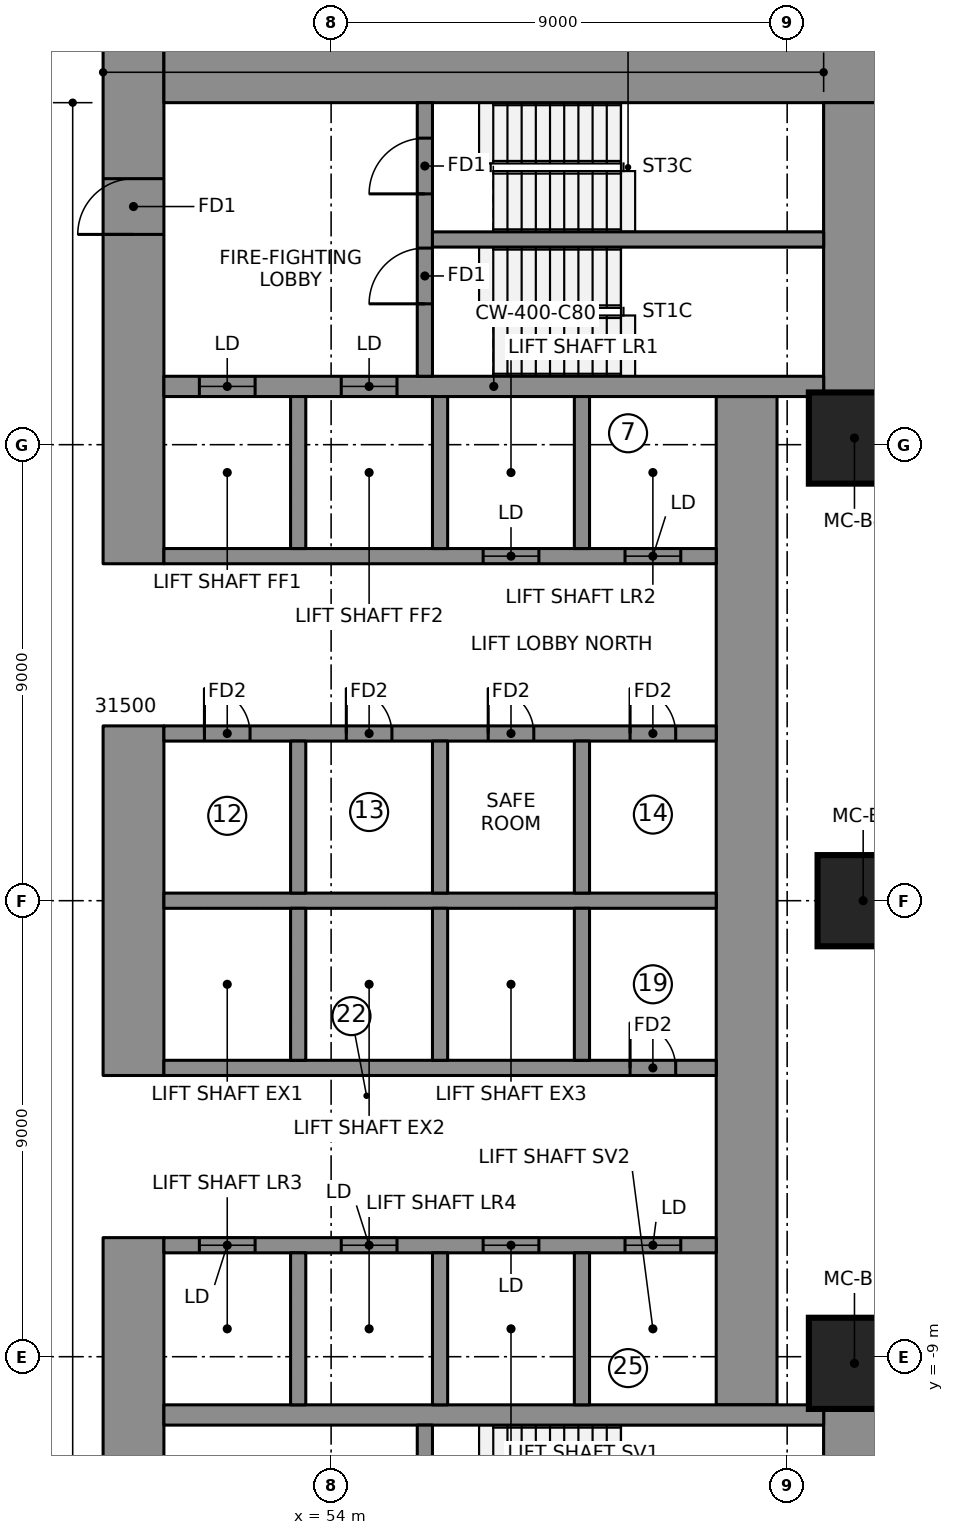
"""IFC4 building model, lengths in metres.
Left out: names, types, materials, properties, quantities, classifications, styles, units other than length and angle.
Written with IfcOpenShell. Run it as: python <this file> out.ifc"""

import sys

from ifc_helpers import new_model, si_unit, direction, frame, frame_2d, origin, origin_2d, place, context, subcontext, project, spatial, rectangle, extrude, element, fill, save


model = new_model("IFC4")
c1 = context("Model", 3, precision=1e-05, world=origin(), true_north=direction((0.0, 1.0)))
c2 = subcontext(c1, "Body", "Model", "MODEL_VIEW")
j1 = project(units=[si_unit("LENGTHUNIT", "METRE"), si_unit("PLANEANGLEUNIT", "RADIAN")], contexts=[c1])
p1 = place(None, origin())
s1 = spatial("IfcSite", under=j1, at=p1, CompositionType="ELEMENT")
p2 = place(p1, origin())
s2 = spatial("IfcBuilding", under=s1, at=p2, CompositionType="ELEMENT")
p3 = place(p2, frame((0.0, 0.0, 68.0)))
s3 = spatial("IfcBuildingStorey", under=s2, at=p3, CompositionType="ELEMENT", Elevation=68.0)
p4 = place(p3, frame((50.1, 6.65, 0.0), z_axis=(0.0, 0.0, 1.0), x_axis=(0.0, 1.0, 0.0)))
e1 = element("IfcWall", 1, at=p4, inside=s3, PredefinedType="SHEAR", context=c2, shape_type="SweptSolid", body=[
    extrude(rectangle(XDim=10.3, YDim=1.2, at=frame_2d((5.15, 0.0))), origin(), (0.0, 0.0, 1.0), 3.55),
])
p5 = place(p4, frame((6.5, 0.0, 0.0)))
e2 = element("IfcOpeningElement", 2, at=p5, cuts=e1, PredefinedType="OPENING", context=c2, shape_type="SweptSolid", body=[
    extrude(rectangle(XDim=1.1, YDim=2.1, at=frame_2d((0.55, 1.05))), frame((0.0, 0.61, 0.0), z_axis=(0.0, -1.0, 0.0), x_axis=(1.0, 0.0, 0.0)), (0.0, 0.0, 1.0), 1.22),
])
p6 = place(p3, frame((50.1, -3.45, 0.0), z_axis=(0.0, 0.0, 1.0), x_axis=(0.0, 1.0, 0.0)))
e3 = element("IfcWall", 3, at=p6, inside=s3, PredefinedType="SHEAR", context=c2, shape_type="SweptSolid", body=[
    extrude(rectangle(XDim=6.9, YDim=1.2, at=frame_2d((3.45, 0.0))), origin(), (0.0, 0.0, 1.0), 3.55),
])
p7 = place(p3, frame((50.1, -16.95, 0.0), z_axis=(0.0, 0.0, 1.0), x_axis=(0.0, 1.0, 0.0)))
e4 = element("IfcWall", 4, at=p7, inside=s3, PredefinedType="SHEAR", context=c2, shape_type="SweptSolid", body=[
    extrude(rectangle(XDim=10.3, YDim=1.2, at=frame_2d((5.15, 0.0))), origin(), (0.0, 0.0, 1.0), 3.55),
])
p8 = place(p7, frame((2.7, 0.0, 0.0)))
e5 = element("IfcOpeningElement", 5, at=p8, cuts=e4, PredefinedType="OPENING", context=c2, shape_type="SweptSolid", body=[
    extrude(rectangle(XDim=1.1, YDim=2.1, at=frame_2d((0.55, 1.05))), frame((0.0, 0.61, 0.0), z_axis=(0.0, -1.0, 0.0), x_axis=(1.0, 0.0, 0.0)), (0.0, 0.0, 1.0), 1.22),
])
p9 = place(p3, frame((50.7, 16.35, 0.0), z_axis=(0.0, 0.0, 1.0), x_axis=(1.0, 0.0, 0.0)))
e6 = element("IfcWall", 6, at=p9, inside=s3, PredefinedType="SHEAR", context=c2, shape_type="SweptSolid", body=[
    extrude(rectangle(XDim=14.22, YDim=1.2, at=frame_2d((7.11, 0.0))), origin(), (0.0, 0.0, 1.0), 3.55),
])
for number, where, z_axis, x_axis in (
    (7, (64.32, 9.95, 0.0), (0.0, 0.0, 1.0), (0.0, 1.0, 0.0)),
    (8, (64.32, -15.75, 0.0), (0.0, 0.0, 1.0), (0.0, 1.0, 0.0)),
):
    element("IfcWall", number, at=place(p3, frame(where, z_axis=z_axis, x_axis=x_axis)), inside=s3, PredefinedType="SHEAR", context=c2, shape_type="SweptSolid", body=[
        extrude(rectangle(XDim=5.8, YDim=1.2, at=frame_2d((2.9, 0.0))), origin(), (0.0, 0.0, 1.0), 3.55),
    ])
p10 = place(p3, frame((62.2, -9.95, 0.0), z_axis=(0.0, 0.0, 1.0), x_axis=(0.0, 1.0, 0.0)))
e9 = element("IfcWall", 9, at=p10, inside=s3, PredefinedType="SHEAR", context=c2, shape_type="SweptSolid", body=[
    extrude(rectangle(XDim=19.9, YDim=1.2, at=frame_2d((9.95, 0.0))), origin(), (0.0, 0.0, 1.0), 3.55),
])
p11 = place(p3, frame((50.7, 10.15, 0.0), z_axis=(0.0, 0.0, 1.0), x_axis=(1.0, 0.0, 0.0)))
e10 = element("IfcWall", 10, at=p11, inside=s3, PredefinedType="SHEAR", context=c2, shape_type="SweptSolid", body=[
    extrude(rectangle(XDim=13.02, YDim=0.4, at=frame_2d((6.51, 0.0))), origin(), (0.0, 0.0, 1.0), 3.55),
])
p12 = place(p11, frame((0.7, 0.0, 0.0)))
e11 = element("IfcOpeningElement", 11, at=p12, cuts=e10, PredefinedType="OPENING", context=c2, shape_type="SweptSolid", body=[
    extrude(rectangle(XDim=1.1, YDim=2.1, at=frame_2d((0.55, 1.05))), frame((0.0, 0.21, 0.0), z_axis=(0.0, -1.0, 0.0), x_axis=(1.0, 0.0, 0.0)), (0.0, 0.0, 1.0), 0.42),
])
p13 = place(p11, frame((3.5, 0.0, 0.0)))
e12 = element("IfcOpeningElement", 12, at=p13, cuts=e10, PredefinedType="OPENING", context=c2, shape_type="SweptSolid", body=[
    extrude(rectangle(XDim=1.1, YDim=2.1, at=frame_2d((0.55, 1.05))), frame((0.0, 0.21, 0.0), z_axis=(0.0, -1.0, 0.0), x_axis=(1.0, 0.0, 0.0)), (0.0, 0.0, 1.0), 0.42),
])
p14 = place(p3, frame((50.7, -10.15, 0.0), z_axis=(0.0, 0.0, 1.0), x_axis=(1.0, 0.0, 0.0)))
e13 = element("IfcWall", 13, at=p14, inside=s3, PredefinedType="SHEAR", context=c2, shape_type="SweptSolid", body=[
    extrude(rectangle(XDim=13.02, YDim=0.4, at=frame_2d((6.51, 0.0))), origin(), (0.0, 0.0, 1.0), 3.55),
])
p15 = place(p3, frame((50.7, 0.0, 0.0), z_axis=(0.0, 0.0, 1.0), x_axis=(1.0, 0.0, 0.0)))
e14 = element("IfcWall", 14, at=p15, inside=s3, PredefinedType="SHEAR", context=c2, shape_type="SweptSolid", body=[
    extrude(rectangle(XDim=10.9, YDim=0.3, at=frame_2d((5.45, 0.0))), origin(), (0.0, 0.0, 1.0), 3.55),
])
p16 = place(p3, frame((50.7, 3.3, 0.0), z_axis=(0.0, 0.0, 1.0), x_axis=(1.0, 0.0, 0.0)))
e15 = element("IfcWall", 15, at=p16, inside=s3, PredefinedType="SHEAR", context=c2, shape_type="SweptSolid", body=[
    extrude(rectangle(XDim=10.9, YDim=0.3, at=frame_2d((5.45, 0.0))), origin(), (0.0, 0.0, 1.0), 3.55),
])
p17 = place(p16, frame((0.8, 0.0, 0.0)))
e16 = element("IfcOpeningElement", 16, at=p17, cuts=e15, PredefinedType="OPENING", context=c2, shape_type="SweptSolid", body=[
    extrude(rectangle(XDim=0.9, YDim=2.1, at=frame_2d((0.45, 1.05))), frame((0.0, 0.16, 0.0), z_axis=(0.0, -1.0, 0.0), x_axis=(1.0, 0.0, 0.0)), (0.0, 0.0, 1.0), 0.32),
])
p18 = place(p16, frame((3.6, 0.0, 0.0)))
e17 = element("IfcOpeningElement", 17, at=p18, cuts=e15, PredefinedType="OPENING", context=c2, shape_type="SweptSolid", body=[
    extrude(rectangle(XDim=0.9, YDim=2.1, at=frame_2d((0.45, 1.05))), frame((0.0, 0.16, 0.0), z_axis=(0.0, -1.0, 0.0), x_axis=(1.0, 0.0, 0.0)), (0.0, 0.0, 1.0), 0.32),
])
p19 = place(p16, frame((6.4, 0.0, 0.0)))
e18 = element("IfcOpeningElement", 18, at=p19, cuts=e15, PredefinedType="OPENING", context=c2, shape_type="SweptSolid", body=[
    extrude(rectangle(XDim=0.9, YDim=2.1, at=frame_2d((0.45, 1.05))), frame((0.0, 0.16, 0.0), z_axis=(0.0, -1.0, 0.0), x_axis=(1.0, 0.0, 0.0)), (0.0, 0.0, 1.0), 0.32),
])
p20 = place(p16, frame((9.2, 0.0, 0.0)))
e19 = element("IfcOpeningElement", 19, at=p20, cuts=e15, PredefinedType="OPENING", context=c2, shape_type="SweptSolid", body=[
    extrude(rectangle(XDim=0.9, YDim=2.1, at=frame_2d((0.45, 1.05))), frame((0.0, 0.16, 0.0), z_axis=(0.0, -1.0, 0.0), x_axis=(1.0, 0.0, 0.0)), (0.0, 0.0, 1.0), 0.32),
])
p21 = place(p3, frame((50.7, 6.8, 0.0), z_axis=(0.0, 0.0, 1.0), x_axis=(1.0, 0.0, 0.0)))
e20 = element("IfcWall", 20, at=p21, inside=s3, PredefinedType="SHEAR", context=c2, shape_type="SweptSolid", body=[
    extrude(rectangle(XDim=10.9, YDim=0.3, at=frame_2d((5.45, 0.0))), origin(), (0.0, 0.0, 1.0), 3.55),
])
p22 = place(p21, frame((6.3, 0.0, 0.0)))
e21 = element("IfcOpeningElement", 21, at=p22, cuts=e20, PredefinedType="OPENING", context=c2, shape_type="SweptSolid", body=[
    extrude(rectangle(XDim=1.1, YDim=2.1, at=frame_2d((0.55, 1.05))), frame((0.0, 0.16, 0.0), z_axis=(0.0, -1.0, 0.0), x_axis=(1.0, 0.0, 0.0)), (0.0, 0.0, 1.0), 0.32),
])
p23 = place(p21, frame((9.1, 0.0, 0.0)))
e22 = element("IfcOpeningElement", 22, at=p23, cuts=e20, PredefinedType="OPENING", context=c2, shape_type="SweptSolid", body=[
    extrude(rectangle(XDim=1.1, YDim=2.1, at=frame_2d((0.55, 1.05))), frame((0.0, 0.16, 0.0), z_axis=(0.0, -1.0, 0.0), x_axis=(1.0, 0.0, 0.0)), (0.0, 0.0, 1.0), 0.32),
])
for number, where, z_axis, x_axis in (
    (23, (53.35, 0.15, 0.0), (0.0, 0.0, 1.0), (0.0, 1.0, 0.0)),
    (24, (53.35, 6.95, 0.0), (0.0, 0.0, 1.0), (0.0, 1.0, 0.0)),
    (25, (56.15, 0.15, 0.0), (0.0, 0.0, 1.0), (0.0, 1.0, 0.0)),
    (26, (56.15, 6.95, 0.0), (0.0, 0.0, 1.0), (0.0, 1.0, 0.0)),
    (27, (58.95, 0.15, 0.0), (0.0, 0.0, 1.0), (0.0, 1.0, 0.0)),
    (28, (58.95, 6.95, 0.0), (0.0, 0.0, 1.0), (0.0, 1.0, 0.0)),
):
    element("IfcWall", number, at=place(p3, frame(where, z_axis=z_axis, x_axis=x_axis)), inside=s3, PredefinedType="SHEAR", context=c2, shape_type="SweptSolid", body=[
        extrude(rectangle(XDim=3.0, YDim=0.3, at=frame_2d((1.5, 0.0))), origin(), (0.0, 0.0, 1.0), 3.55),
    ])
p24 = place(p3, frame((50.7, -3.3, 0.0), z_axis=(0.0, 0.0, 1.0), x_axis=(1.0, 0.0, 0.0)))
e29 = element("IfcWall", 29, at=p24, inside=s3, PredefinedType="SHEAR", context=c2, shape_type="SweptSolid", body=[
    extrude(rectangle(XDim=10.9, YDim=0.3, at=frame_2d((5.45, 0.0))), origin(), (0.0, 0.0, 1.0), 3.55),
])
p25 = place(p24, frame((9.2, 0.0, 0.0)))
e30 = element("IfcOpeningElement", 30, at=p25, cuts=e29, PredefinedType="OPENING", context=c2, shape_type="SweptSolid", body=[
    extrude(rectangle(XDim=0.9, YDim=2.1, at=frame_2d((0.45, 1.05))), frame((0.0, 0.16, 0.0), z_axis=(0.0, -1.0, 0.0), x_axis=(1.0, 0.0, 0.0)), (0.0, 0.0, 1.0), 0.32),
])
p26 = place(p3, frame((50.7, -6.8, 0.0), z_axis=(0.0, 0.0, 1.0), x_axis=(1.0, 0.0, 0.0)))
e31 = element("IfcWall", 31, at=p26, inside=s3, PredefinedType="SHEAR", context=c2, shape_type="SweptSolid", body=[
    extrude(rectangle(XDim=10.9, YDim=0.3, at=frame_2d((5.45, 0.0))), origin(), (0.0, 0.0, 1.0), 3.55),
])
p27 = place(p26, frame((0.7, 0.0, 0.0)))
e32 = element("IfcOpeningElement", 32, at=p27, cuts=e31, PredefinedType="OPENING", context=c2, shape_type="SweptSolid", body=[
    extrude(rectangle(XDim=1.1, YDim=2.1, at=frame_2d((0.55, 1.05))), frame((0.0, 0.16, 0.0), z_axis=(0.0, -1.0, 0.0), x_axis=(1.0, 0.0, 0.0)), (0.0, 0.0, 1.0), 0.32),
])
p28 = place(p26, frame((3.5, 0.0, 0.0)))
e33 = element("IfcOpeningElement", 33, at=p28, cuts=e31, PredefinedType="OPENING", context=c2, shape_type="SweptSolid", body=[
    extrude(rectangle(XDim=1.1, YDim=2.1, at=frame_2d((0.55, 1.05))), frame((0.0, 0.16, 0.0), z_axis=(0.0, -1.0, 0.0), x_axis=(1.0, 0.0, 0.0)), (0.0, 0.0, 1.0), 0.32),
])
p29 = place(p26, frame((6.3, 0.0, 0.0)))
e34 = element("IfcOpeningElement", 34, at=p29, cuts=e31, PredefinedType="OPENING", context=c2, shape_type="SweptSolid", body=[
    extrude(rectangle(XDim=1.1, YDim=2.1, at=frame_2d((0.55, 1.05))), frame((0.0, 0.16, 0.0), z_axis=(0.0, -1.0, 0.0), x_axis=(1.0, 0.0, 0.0)), (0.0, 0.0, 1.0), 0.32),
])
p30 = place(p26, frame((9.1, 0.0, 0.0)))
e35 = element("IfcOpeningElement", 35, at=p30, cuts=e31, PredefinedType="OPENING", context=c2, shape_type="SweptSolid", body=[
    extrude(rectangle(XDim=1.1, YDim=2.1, at=frame_2d((0.55, 1.05))), frame((0.0, 0.16, 0.0), z_axis=(0.0, -1.0, 0.0), x_axis=(1.0, 0.0, 0.0)), (0.0, 0.0, 1.0), 0.32),
])
for number, where, z_axis, x_axis in (
    (36, (53.35, -3.15, 0.0), (0.0, 0.0, 1.0), (0.0, 1.0, 0.0)),
    (37, (53.35, -9.95, 0.0), (0.0, 0.0, 1.0), (0.0, 1.0, 0.0)),
    (38, (56.15, -3.15, 0.0), (0.0, 0.0, 1.0), (0.0, 1.0, 0.0)),
    (39, (56.15, -9.95, 0.0), (0.0, 0.0, 1.0), (0.0, 1.0, 0.0)),
    (40, (58.95, -3.15, 0.0), (0.0, 0.0, 1.0), (0.0, 1.0, 0.0)),
    (41, (58.95, -9.95, 0.0), (0.0, 0.0, 1.0), (0.0, 1.0, 0.0)),
):
    element("IfcWall", number, at=place(p3, frame(where, z_axis=z_axis, x_axis=x_axis)), inside=s3, PredefinedType="SHEAR", context=c2, shape_type="SweptSolid", body=[
        extrude(rectangle(XDim=3.0, YDim=0.3, at=frame_2d((1.5, 0.0))), origin(), (0.0, 0.0, 1.0), 3.55),
    ])
p31 = place(p3, frame((55.85, 10.35, 0.0), z_axis=(0.0, 0.0, 1.0), x_axis=(0.0, 1.0, 0.0)))
e42 = element("IfcWall", 42, at=p31, inside=s3, PredefinedType="SHEAR", context=c2, shape_type="SweptSolid", body=[
    extrude(rectangle(XDim=5.4, YDim=0.3, at=frame_2d((2.7, 0.0))), origin(), (0.0, 0.0, 1.0), 3.55),
])
p32 = place(p31, frame((1.43, 0.0, 0.0)))
e43 = element("IfcOpeningElement", 43, at=p32, cuts=e42, PredefinedType="OPENING", context=c2, shape_type="SweptSolid", body=[
    extrude(rectangle(XDim=1.1, YDim=2.1, at=frame_2d((0.55, 1.05))), frame((0.0, 0.16, 0.0), z_axis=(0.0, -1.0, 0.0), x_axis=(1.0, 0.0, 0.0)), (0.0, 0.0, 1.0), 0.32),
])
p33 = place(p31, frame((3.6, 0.0, 0.0)))
e44 = element("IfcOpeningElement", 44, at=p33, cuts=e42, PredefinedType="OPENING", context=c2, shape_type="SweptSolid", body=[
    extrude(rectangle(XDim=1.1, YDim=2.1, at=frame_2d((0.55, 1.05))), frame((0.0, 0.16, 0.0), z_axis=(0.0, -1.0, 0.0), x_axis=(1.0, 0.0, 0.0)), (0.0, 0.0, 1.0), 0.32),
])
p34 = place(p3, frame((55.85, -15.75, 0.0), z_axis=(0.0, 0.0, 1.0), x_axis=(0.0, 1.0, 0.0)))
e45 = element("IfcWall", 45, at=p34, inside=s3, PredefinedType="SHEAR", context=c2, shape_type="SweptSolid", body=[
    extrude(rectangle(XDim=5.4, YDim=0.3, at=frame_2d((2.7, 0.0))), origin(), (0.0, 0.0, 1.0), 3.55),
])
p35 = place(p34, frame((3.6, 0.0, 0.0)))
e46 = element("IfcOpeningElement", 46, at=p35, cuts=e45, PredefinedType="OPENING", context=c2, shape_type="SweptSolid", body=[
    extrude(rectangle(XDim=1.1, YDim=2.1, at=frame_2d((0.55, 1.05))), frame((0.0, 0.16, 0.0), z_axis=(0.0, -1.0, 0.0), x_axis=(1.0, 0.0, 0.0)), (0.0, 0.0, 1.0), 0.32),
])
p36 = place(p34, frame((0.8, 0.0, 0.0)))
e47 = element("IfcOpeningElement", 47, at=p36, cuts=e45, PredefinedType="OPENING", context=c2, shape_type="SweptSolid", body=[
    extrude(rectangle(XDim=0.9, YDim=2.1, at=frame_2d((0.45, 1.05))), frame((0.0, 0.16, 0.0), z_axis=(0.0, -1.0, 0.0), x_axis=(1.0, 0.0, 0.0)), (0.0, 0.0, 1.0), 0.32),
])
p37 = place(p3, frame((56.0, 13.05, 0.0), z_axis=(0.0, 0.0, 1.0), x_axis=(1.0, 0.0, 0.0)))
e48 = element("IfcWall", 48, at=p37, inside=s3, PredefinedType="SHEAR", context=c2, shape_type="SweptSolid", body=[
    extrude(rectangle(XDim=7.72, YDim=0.3, at=frame_2d((3.86, 0.0))), origin(), (0.0, 0.0, 1.0), 3.55),
])
for number, where, z_axis, x_axis in (
    (49, (64.328, -9.131, 0.0), (0.0, 0.0, 1.0), (1.0, 0.0, 0.0)),
    (50, (64.5, 0.0, 0.0), (0.0, 0.0, 1.0), (1.0, 0.0, 0.0)),
    (51, (64.328, 9.131, 0.0), (0.0, 0.0, 1.0), (1.0, 0.0, 0.0)),
):
    element("IfcColumn", number, at=place(p3, frame(where, z_axis=z_axis, x_axis=x_axis)), inside=s3, PredefinedType="COLUMN", context=c2, shape_type="SweptSolid", body=[
        extrude(rectangle(XDim=1.8, YDim=1.8, at=origin_2d()), origin(), (0.0, 0.0, 1.0), 3.55),
    ])
p38 = place(p12, origin())
e52 = element("IfcDoor", 52, at=p38, inside=s3, OperationType="DOUBLE_DOOR_SLIDING", PredefinedType="DOOR", context=c2, shape_type="SweptSolid", body=[
    extrude(rectangle(XDim=1.1, YDim=2.1, at=frame_2d((0.55, 1.05))), frame((0.0, 0.025, 0.0), z_axis=(0.0, -1.0, 0.0), x_axis=(1.0, 0.0, 0.0)), (0.0, 0.0, 1.0), 0.05),
])
fill(e11, e52)
p39 = place(p13, origin())
e53 = element("IfcDoor", 53, at=p39, inside=s3, OperationType="DOUBLE_DOOR_SLIDING", PredefinedType="DOOR", context=c2, shape_type="SweptSolid", body=[
    extrude(rectangle(XDim=1.1, YDim=2.1, at=frame_2d((0.55, 1.05))), frame((0.0, 0.025, 0.0), z_axis=(0.0, -1.0, 0.0), x_axis=(1.0, 0.0, 0.0)), (0.0, 0.0, 1.0), 0.05),
])
fill(e12, e53)
p40 = place(p22, origin())
e54 = element("IfcDoor", 54, at=p40, inside=s3, OperationType="DOUBLE_DOOR_SLIDING", PredefinedType="DOOR", context=c2, shape_type="SweptSolid", body=[
    extrude(rectangle(XDim=1.1, YDim=2.1, at=frame_2d((0.55, 1.05))), frame((0.0, 0.025, 0.0), z_axis=(0.0, -1.0, 0.0), x_axis=(1.0, 0.0, 0.0)), (0.0, 0.0, 1.0), 0.05),
])
fill(e21, e54)
p41 = place(p23, origin())
e55 = element("IfcDoor", 55, at=p41, inside=s3, OperationType="DOUBLE_DOOR_SLIDING", PredefinedType="DOOR", context=c2, shape_type="SweptSolid", body=[
    extrude(rectangle(XDim=1.1, YDim=2.1, at=frame_2d((0.55, 1.05))), frame((0.0, 0.025, 0.0), z_axis=(0.0, -1.0, 0.0), x_axis=(1.0, 0.0, 0.0)), (0.0, 0.0, 1.0), 0.05),
])
fill(e22, e55)
p42 = place(p27, origin())
e56 = element("IfcDoor", 56, at=p42, inside=s3, OperationType="DOUBLE_DOOR_SLIDING", PredefinedType="DOOR", context=c2, shape_type="SweptSolid", body=[
    extrude(rectangle(XDim=1.1, YDim=2.1, at=frame_2d((0.55, 1.05))), frame((0.0, 0.025, 0.0), z_axis=(0.0, -1.0, 0.0), x_axis=(1.0, 0.0, 0.0)), (0.0, 0.0, 1.0), 0.05),
])
fill(e32, e56)
p43 = place(p28, origin())
e57 = element("IfcDoor", 57, at=p43, inside=s3, OperationType="DOUBLE_DOOR_SLIDING", PredefinedType="DOOR", context=c2, shape_type="SweptSolid", body=[
    extrude(rectangle(XDim=1.1, YDim=2.1, at=frame_2d((0.55, 1.05))), frame((0.0, 0.025, 0.0), z_axis=(0.0, -1.0, 0.0), x_axis=(1.0, 0.0, 0.0)), (0.0, 0.0, 1.0), 0.05),
])
fill(e33, e57)
p44 = place(p29, origin())
e58 = element("IfcDoor", 58, at=p44, inside=s3, OperationType="DOUBLE_DOOR_SLIDING", PredefinedType="DOOR", context=c2, shape_type="SweptSolid", body=[
    extrude(rectangle(XDim=1.1, YDim=2.1, at=frame_2d((0.55, 1.05))), frame((0.0, 0.025, 0.0), z_axis=(0.0, -1.0, 0.0), x_axis=(1.0, 0.0, 0.0)), (0.0, 0.0, 1.0), 0.05),
])
fill(e34, e58)
p45 = place(p30, origin())
e59 = element("IfcDoor", 59, at=p45, inside=s3, OperationType="DOUBLE_DOOR_SLIDING", PredefinedType="DOOR", context=c2, shape_type="SweptSolid", body=[
    extrude(rectangle(XDim=1.1, YDim=2.1, at=frame_2d((0.55, 1.05))), frame((0.0, 0.025, 0.0), z_axis=(0.0, -1.0, 0.0), x_axis=(1.0, 0.0, 0.0)), (0.0, 0.0, 1.0), 0.05),
])
fill(e35, e59)
p46 = place(p32, origin())
e60 = element("IfcDoor", 60, at=p46, inside=s3, OperationType="SINGLE_SWING_RIGHT", PredefinedType="DOOR", context=c2, shape_type="SweptSolid", body=[
    extrude(rectangle(XDim=1.1, YDim=2.1, at=frame_2d((0.55, 1.05))), frame((0.0, 0.025, 0.0), z_axis=(0.0, -1.0, 0.0), x_axis=(1.0, 0.0, 0.0)), (0.0, 0.0, 1.0), 0.05),
])
fill(e43, e60)
p47 = place(p33, origin())
e61 = element("IfcDoor", 61, at=p47, inside=s3, OperationType="SINGLE_SWING_RIGHT", PredefinedType="DOOR", context=c2, shape_type="SweptSolid", body=[
    extrude(rectangle(XDim=1.1, YDim=2.1, at=frame_2d((0.55, 1.05))), frame((0.0, 0.025, 0.0), z_axis=(0.0, -1.0, 0.0), x_axis=(1.0, 0.0, 0.0)), (0.0, 0.0, 1.0), 0.05),
])
fill(e44, e61)
p48 = place(p5, origin())
e62 = element("IfcDoor", 62, at=p48, inside=s3, OperationType="SINGLE_SWING_RIGHT", PredefinedType="DOOR", context=c2, shape_type="SweptSolid", body=[
    extrude(rectangle(XDim=1.1, YDim=2.1, at=frame_2d((0.55, 1.05))), frame((0.0, 0.025, 0.0), z_axis=(0.0, -1.0, 0.0), x_axis=(1.0, 0.0, 0.0)), (0.0, 0.0, 1.0), 0.05),
])
fill(e2, e62)
p49 = place(p17, origin())
e63 = element("IfcDoor", 63, at=p49, inside=s3, OperationType="SINGLE_SWING_LEFT", PredefinedType="DOOR", context=c2, shape_type="SweptSolid", body=[
    extrude(rectangle(XDim=0.9, YDim=2.1, at=frame_2d((0.45, 1.05))), frame((0.0, 0.025, 0.0), z_axis=(0.0, -1.0, 0.0), x_axis=(1.0, 0.0, 0.0)), (0.0, 0.0, 1.0), 0.05),
])
fill(e16, e63)
p50 = place(p18, origin())
e64 = element("IfcDoor", 64, at=p50, inside=s3, OperationType="SINGLE_SWING_LEFT", PredefinedType="DOOR", context=c2, shape_type="SweptSolid", body=[
    extrude(rectangle(XDim=0.9, YDim=2.1, at=frame_2d((0.45, 1.05))), frame((0.0, 0.025, 0.0), z_axis=(0.0, -1.0, 0.0), x_axis=(1.0, 0.0, 0.0)), (0.0, 0.0, 1.0), 0.05),
])
fill(e17, e64)
p51 = place(p19, origin())
e65 = element("IfcDoor", 65, at=p51, inside=s3, OperationType="SINGLE_SWING_LEFT", PredefinedType="DOOR", context=c2, shape_type="SweptSolid", body=[
    extrude(rectangle(XDim=0.9, YDim=2.1, at=frame_2d((0.45, 1.05))), frame((0.0, 0.025, 0.0), z_axis=(0.0, -1.0, 0.0), x_axis=(1.0, 0.0, 0.0)), (0.0, 0.0, 1.0), 0.05),
])
fill(e18, e65)
p52 = place(p20, origin())
e66 = element("IfcDoor", 66, at=p52, inside=s3, OperationType="SINGLE_SWING_LEFT", PredefinedType="DOOR", context=c2, shape_type="SweptSolid", body=[
    extrude(rectangle(XDim=0.9, YDim=2.1, at=frame_2d((0.45, 1.05))), frame((0.0, 0.025, 0.0), z_axis=(0.0, -1.0, 0.0), x_axis=(1.0, 0.0, 0.0)), (0.0, 0.0, 1.0), 0.05),
])
fill(e19, e66)
p53 = place(p25, origin())
e67 = element("IfcDoor", 67, at=p53, inside=s3, OperationType="SINGLE_SWING_LEFT", PredefinedType="DOOR", context=c2, shape_type="SweptSolid", body=[
    extrude(rectangle(XDim=0.9, YDim=2.1, at=frame_2d((0.45, 1.05))), frame((0.0, 0.025, 0.0), z_axis=(0.0, -1.0, 0.0), x_axis=(1.0, 0.0, 0.0)), (0.0, 0.0, 1.0), 0.05),
])
fill(e30, e67)
save(model, sys.argv[1])
